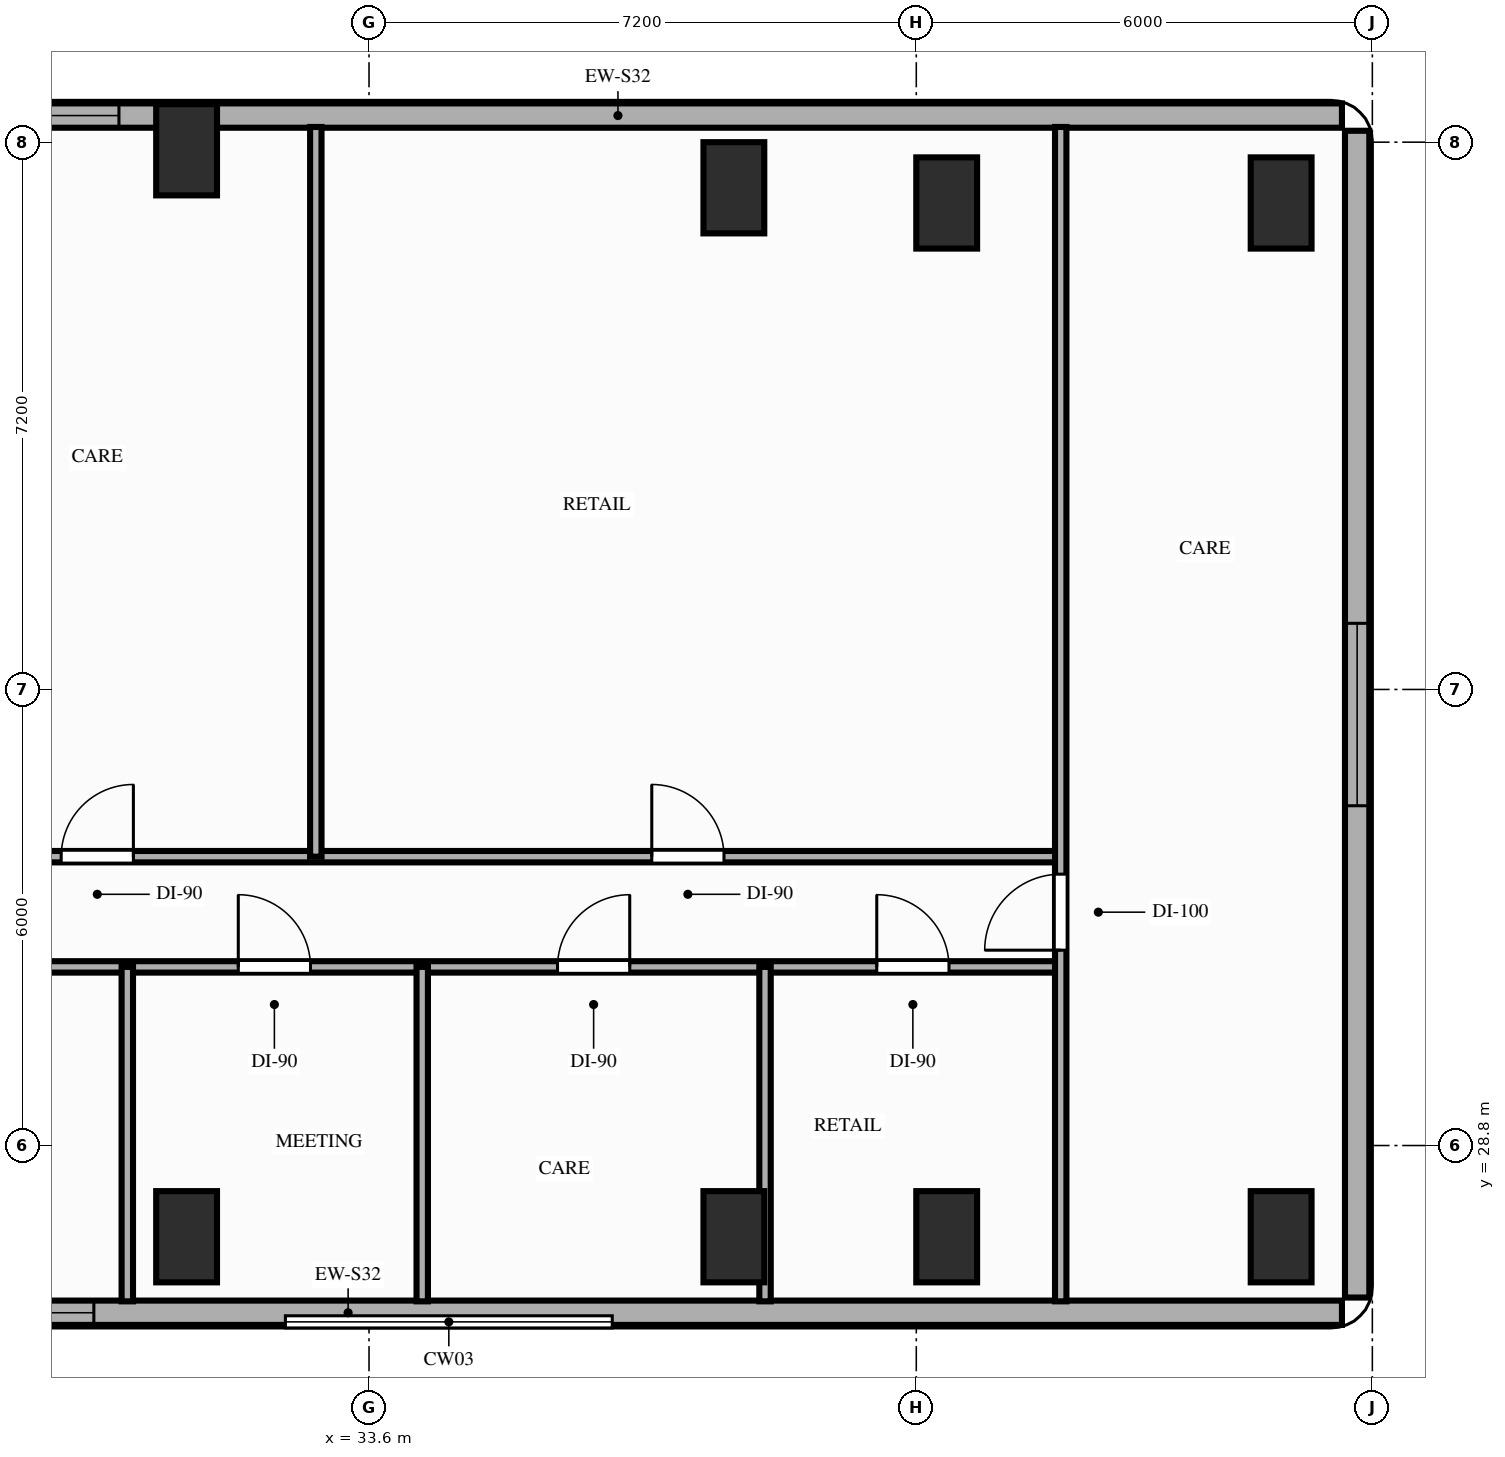
"""IFC4 building model, lengths in metres.
Left out: names, types, materials, properties, quantities, classifications, styles, units other than length and angle.
Written with IfcOpenShell. Run it as: python <this file> out.ifc"""

import sys

from ifc_helpers import new_model, si_unit, direction, frame, frame_2d, origin, origin_2d, place, context, subcontext, project, spatial, rectangle, extrude, element, fill, save


model = new_model("IFC4")
c1 = context("Model", 3, precision=1e-05, world=origin(), true_north=direction((0.0, 1.0)))
c2 = subcontext(c1, "Body", "Model", "MODEL_VIEW")
j1 = project(units=[si_unit("LENGTHUNIT", "METRE"), si_unit("PLANEANGLEUNIT", "RADIAN")], contexts=[c1])
p1 = place(None, origin())
s1 = spatial("IfcSite", under=j1, at=p1, CompositionType="ELEMENT")
p2 = place(p1, origin())
s2 = spatial("IfcBuilding", under=s1, at=p2, CompositionType="ELEMENT")
p3 = place(p2, frame((0.0, 0.0, 72.4)))
s3 = spatial("IfcBuildingStorey", under=s2, at=p3, CompositionType="ELEMENT", Elevation=72.4)
for number, where, z_axis, x_axis in (
    (1, (31.2, 27.6, 0.0), (0.0, 0.0, 1.0), (1.0, 0.0, 0.0)),
    (2, (31.2, 41.9, 0.0), (0.0, 0.0, 1.0), (1.0, 0.0, 0.0)),
    (3, (38.4, 27.6, 0.0), (0.0, 0.0, 1.0), (1.0, 0.0, 0.0)),
    (4, (38.4, 41.4, 0.0), (0.0, 0.0, 1.0), (1.0, 0.0, 0.0)),
    (5, (41.2, 27.6, 0.0), (0.0, 0.0, 1.0), (1.0, 0.0, 0.0)),
    (6, (41.2, 41.2, 0.0), (0.0, 0.0, 1.0), (1.0, 0.0, 0.0)),
    (7, (45.6, 27.6, 0.0), (0.0, 0.0, 1.0), (1.0, 0.0, 0.0)),
    (8, (45.6, 41.2, 0.0), (0.0, 0.0, 1.0), (1.0, 0.0, 0.0)),
):
    element("IfcColumn", number, at=place(p3, frame(where, z_axis=z_axis, x_axis=x_axis)), inside=s3, PredefinedType="COLUMN", context=c2, shape_type="SweptSolid", body=[
        extrude(rectangle(XDim=0.8, YDim=1.2, at=origin_2d()), origin(), (0.0, 0.0, 1.0), 3.2),
    ])
p4 = place(p3, frame((46.4, 42.35, 0.0), z_axis=(0.0, 0.0, 1.0), x_axis=(-1.0, 0.0, 0.0)))
e9 = element("IfcWall", 9, at=p4, inside=s3, PredefinedType="STANDARD", context=c2, shape_type="SweptSolid", body=[
    extrude(rectangle(XDim=19.05, YDim=0.32, at=frame_2d((9.525, 0.0))), origin(), (0.0, 0.0, 1.0), 2.35),
])
p5 = place(p4, frame((16.09, 0.0, 0.85)))
e10 = element("IfcOpeningElement", 10, at=p5, cuts=e9, PredefinedType="OPENING", context=c2, shape_type="SweptSolid", body=[
    extrude(rectangle(XDim=2.4, YDim=1.25, at=frame_2d((1.2, 0.625))), frame((0.0, 0.17, 0.0), z_axis=(0.0, -1.0, 0.0), x_axis=(1.0, 0.0, 0.0)), (0.0, 0.0, 1.0), 0.34),
])
p6 = place(p3, frame((20.25, 26.6, 0.0), z_axis=(0.0, 0.0, 1.0), x_axis=(1.0, 0.0, 0.0)))
e11 = element("IfcWall", 11, at=p6, inside=s3, PredefinedType="STANDARD", context=c2, shape_type="SweptSolid", body=[
    extrude(rectangle(XDim=26.15, YDim=0.32, at=frame_2d((13.075, 0.0))), origin(), (0.0, 0.0, 1.0), 2.96),
])
p7 = place(p6, frame((2.35, 0.0, 0.85)))
e12 = element("IfcOpeningElement", 12, at=p7, cuts=e11, PredefinedType="OPENING", context=c2, shape_type="SweptSolid", body=[
    extrude(rectangle(XDim=2.4, YDim=1.8, at=frame_2d((1.2, 0.9))), frame((0.0, 0.17, 0.0), z_axis=(0.0, -1.0, 0.0), x_axis=(1.0, 0.0, 0.0)), (0.0, 0.0, 1.0), 0.34),
])
p8 = place(p6, frame((7.33, 0.0, 0.85)))
e13 = element("IfcOpeningElement", 13, at=p8, cuts=e11, PredefinedType="OPENING", context=c2, shape_type="SweptSolid", body=[
    extrude(rectangle(XDim=2.4, YDim=1.8, at=frame_2d((1.2, 0.9))), frame((0.0, 0.17, 0.0), z_axis=(0.0, -1.0, 0.0), x_axis=(1.0, 0.0, 0.0)), (0.0, 0.0, 1.0), 0.34),
])
p9 = place(p3, frame((46.6, 26.8, 0.0), z_axis=(0.0, 0.0, 1.0), x_axis=(0.0, 1.0, 0.0)))
e14 = element("IfcWall", 14, at=p9, inside=s3, PredefinedType="STANDARD", context=c2, shape_type="SweptSolid", body=[
    extrude(rectangle(XDim=15.35, YDim=0.32, at=frame_2d((7.675, 0.0))), origin(), (0.0, 0.0, 1.0), 2.96),
])
p10 = place(p9, frame((6.47, 0.0, 0.85)))
e15 = element("IfcOpeningElement", 15, at=p10, cuts=e14, PredefinedType="OPENING", context=c2, shape_type="SweptSolid", body=[
    extrude(rectangle(XDim=2.4, YDim=1.8, at=frame_2d((1.2, 0.9))), frame((0.0, 0.17, 0.0), z_axis=(0.0, -1.0, 0.0), x_axis=(1.0, 0.0, 0.0)), (0.0, 0.0, 1.0), 0.34),
])
p11 = place(p3, frame((27.15, 31.15, 0.0), z_axis=(0.0, 0.0, 1.0), x_axis=(1.0, 0.0, 0.0)))
e16 = element("IfcWall", 16, at=p11, inside=s3, PredefinedType="PARTITIONING", context=c2, shape_type="SweptSolid", body=[
    extrude(rectangle(XDim=15.55, YDim=0.15, at=frame_2d((7.775, 0.0))), origin(), (0.0, 0.0, 1.0), 2.35),
])
p12 = place(p11, frame((1.16, 0.0, 0.0)))
e17 = element("IfcOpeningElement", 17, at=p12, cuts=e16, PredefinedType="OPENING", context=c2, shape_type="SweptSolid", body=[
    extrude(rectangle(XDim=0.95, YDim=2.15, at=frame_2d((0.475, 1.075))), frame((0.0, 0.085, 0.0), z_axis=(0.0, -1.0, 0.0), x_axis=(1.0, 0.0, 0.0)), (0.0, 0.0, 1.0), 0.17),
])
p13 = place(p11, frame((4.73, 0.0, 0.0)))
e18 = element("IfcOpeningElement", 18, at=p13, cuts=e16, PredefinedType="OPENING", context=c2, shape_type="SweptSolid", body=[
    extrude(rectangle(XDim=0.95, YDim=2.15, at=frame_2d((0.475, 1.075))), frame((0.0, 0.085, 0.0), z_axis=(0.0, -1.0, 0.0), x_axis=(1.0, 0.0, 0.0)), (0.0, 0.0, 1.0), 0.17),
])
p14 = place(p11, frame((8.93, 0.0, 0.0)))
e19 = element("IfcOpeningElement", 19, at=p14, cuts=e16, PredefinedType="OPENING", context=c2, shape_type="SweptSolid", body=[
    extrude(rectangle(XDim=0.95, YDim=2.15, at=frame_2d((0.475, 1.075))), frame((0.0, 0.085, 0.0), z_axis=(0.0, -1.0, 0.0), x_axis=(1.0, 0.0, 0.0)), (0.0, 0.0, 1.0), 0.17),
])
p15 = place(p11, frame((13.13, 0.0, 0.0)))
e20 = element("IfcOpeningElement", 20, at=p15, cuts=e16, PredefinedType="OPENING", context=c2, shape_type="SweptSolid", body=[
    extrude(rectangle(XDim=0.95, YDim=2.15, at=frame_2d((0.475, 1.075))), frame((0.0, 0.085, 0.0), z_axis=(0.0, -1.0, 0.0), x_axis=(1.0, 0.0, 0.0)), (0.0, 0.0, 1.0), 0.17),
])
p16 = place(p3, frame((27.15, 32.6, 0.0), z_axis=(0.0, 0.0, 1.0), x_axis=(1.0, 0.0, 0.0)))
e21 = element("IfcWall", 21, at=p16, inside=s3, PredefinedType="PARTITIONING", context=c2, shape_type="SweptSolid", body=[
    extrude(rectangle(XDim=15.55, YDim=0.15, at=frame_2d((7.775, 0.0))), origin(), (0.0, 0.0, 1.0), 2.35),
])
p17 = place(p16, frame((2.4, 0.0, 0.0)))
e22 = element("IfcOpeningElement", 22, at=p17, cuts=e21, PredefinedType="OPENING", context=c2, shape_type="SweptSolid", body=[
    extrude(rectangle(XDim=0.95, YDim=2.15, at=frame_2d((0.475, 1.075))), frame((0.0, 0.085, 0.0), z_axis=(0.0, -1.0, 0.0), x_axis=(1.0, 0.0, 0.0)), (0.0, 0.0, 1.0), 0.17),
])
p18 = place(p16, frame((10.17, 0.0, 0.0)))
e23 = element("IfcOpeningElement", 23, at=p18, cuts=e21, PredefinedType="OPENING", context=c2, shape_type="SweptSolid", body=[
    extrude(rectangle(XDim=0.95, YDim=2.15, at=frame_2d((0.475, 1.075))), frame((0.0, 0.085, 0.0), z_axis=(0.0, -1.0, 0.0), x_axis=(1.0, 0.0, 0.0)), (0.0, 0.0, 1.0), 0.17),
])
p19 = place(p3, frame((42.7, 26.75, 0.0), z_axis=(0.0, 0.0, 1.0), x_axis=(0.0, 1.0, 0.0)))
e24 = element("IfcWall", 24, at=p19, inside=s3, PredefinedType="PARTITIONING", context=c2, shape_type="SweptSolid", body=[
    extrude(rectangle(XDim=15.45, YDim=0.15, at=frame_2d((7.725, 0.0))), origin(), (0.0, 0.0, 1.0), 2.35),
])
p20 = place(p19, frame((4.62, 0.0, 0.0)))
e25 = element("IfcOpeningElement", 25, at=p20, cuts=e24, PredefinedType="OPENING", context=c2, shape_type="SweptSolid", body=[
    extrude(rectangle(XDim=1.0, YDim=2.15, at=frame_2d((0.5, 1.075))), frame((0.0, 0.085, 0.0), z_axis=(0.0, -1.0, 0.0), x_axis=(1.0, 0.0, 0.0)), (0.0, 0.0, 1.0), 0.17),
])
for number, where, z_axis, x_axis in (
    (26, (30.42, 26.75, 0.0), (0.0, 0.0, 1.0), (0.0, 1.0, 0.0)),
    (27, (34.3, 26.75, 0.0), (0.0, 0.0, 1.0), (0.0, 1.0, 0.0)),
    (28, (38.81, 26.75, 0.0), (0.0, 0.0, 1.0), (0.0, 1.0, 0.0)),
):
    element("IfcWall", number, at=place(p3, frame(where, z_axis=z_axis, x_axis=x_axis)), inside=s3, PredefinedType="PARTITIONING", context=c2, shape_type="SweptSolid", body=[
        extrude(rectangle(XDim=4.4, YDim=0.15, at=frame_2d((2.2, 0.0))), origin(), (0.0, 0.0, 1.0), 2.35),
    ])
p21 = place(p3, frame((32.9, 32.6, 0.0), z_axis=(0.0, 0.0, 1.0), x_axis=(0.0, 1.0, 0.0)))
e29 = element("IfcWall", 29, at=p21, inside=s3, PredefinedType="PARTITIONING", context=c2, shape_type="SweptSolid", body=[
    extrude(rectangle(XDim=9.6, YDim=0.15, at=frame_2d((4.8, 0.0))), origin(), (0.0, 0.0, 1.0), 2.35),
])
p22 = place(p10, origin())
e30 = element("IfcWindow", 30, at=p22, inside=s3, PartitioningType="SINGLE_PANEL", PredefinedType="WINDOW", context=c2, shape_type="SweptSolid", body=[
    extrude(rectangle(XDim=2.4, YDim=1.8, at=frame_2d((1.2, 0.9))), frame((0.0, 0.03, 0.0), z_axis=(0.0, -1.0, 0.0), x_axis=(1.0, 0.0, 0.0)), (0.0, 0.0, 1.0), 0.06),
])
fill(e15, e30)
p23 = place(p8, origin())
e31 = element("IfcWindow", 31, at=p23, inside=s3, PartitioningType="SINGLE_PANEL", PredefinedType="WINDOW", context=c2, shape_type="SweptSolid", body=[
    extrude(rectangle(XDim=2.4, YDim=1.8, at=frame_2d((1.2, 0.9))), frame((0.0, 0.03, 0.0), z_axis=(0.0, -1.0, 0.0), x_axis=(1.0, 0.0, 0.0)), (0.0, 0.0, 1.0), 0.06),
])
fill(e13, e31)
p24 = place(p5, origin())
e32 = element("IfcWindow", 32, at=p24, inside=s3, PartitioningType="SINGLE_PANEL", PredefinedType="WINDOW", context=c2, shape_type="SweptSolid", body=[
    extrude(rectangle(XDim=2.4, YDim=1.25, at=frame_2d((1.2, 0.625))), frame((0.0, 0.03, 0.0), z_axis=(0.0, -1.0, 0.0), x_axis=(1.0, 0.0, 0.0)), (0.0, 0.0, 1.0), 0.06),
])
fill(e10, e32)
p25 = place(p20, origin())
e33 = element("IfcDoor", 33, at=p25, inside=s3, OperationType="SINGLE_SWING_LEFT", PredefinedType="DOOR", context=c2, shape_type="SweptSolid", body=[
    extrude(rectangle(XDim=1.0, YDim=2.15, at=frame_2d((0.5, 1.075))), frame((0.0, 0.025, 0.0), z_axis=(0.0, -1.0, 0.0), x_axis=(1.0, 0.0, 0.0)), (0.0, 0.0, 1.0), 0.05),
])
fill(e25, e33)
p26 = place(p13, origin())
e34 = element("IfcDoor", 34, at=p26, inside=s3, OperationType="SINGLE_SWING_LEFT", PredefinedType="DOOR", context=c2, shape_type="SweptSolid", body=[
    extrude(rectangle(XDim=0.95, YDim=2.15, at=frame_2d((0.475, 1.075))), frame((0.0, 0.025, 0.0), z_axis=(0.0, -1.0, 0.0), x_axis=(1.0, 0.0, 0.0)), (0.0, 0.0, 1.0), 0.05),
])
fill(e18, e34)
p27 = place(p14, origin())
e35 = element("IfcDoor", 35, at=p27, inside=s3, OperationType="SINGLE_SWING_RIGHT", PredefinedType="DOOR", context=c2, shape_type="SweptSolid", body=[
    extrude(rectangle(XDim=0.95, YDim=2.15, at=frame_2d((0.475, 1.075))), frame((0.0, 0.025, 0.0), z_axis=(0.0, -1.0, 0.0), x_axis=(1.0, 0.0, 0.0)), (0.0, 0.0, 1.0), 0.05),
])
fill(e19, e35)
p28 = place(p15, origin())
e36 = element("IfcDoor", 36, at=p28, inside=s3, OperationType="SINGLE_SWING_LEFT", PredefinedType="DOOR", context=c2, shape_type="SweptSolid", body=[
    extrude(rectangle(XDim=0.95, YDim=2.15, at=frame_2d((0.475, 1.075))), frame((0.0, 0.025, 0.0), z_axis=(0.0, -1.0, 0.0), x_axis=(1.0, 0.0, 0.0)), (0.0, 0.0, 1.0), 0.05),
])
fill(e20, e36)
p29 = place(p17, origin())
e37 = element("IfcDoor", 37, at=p29, inside=s3, OperationType="SINGLE_SWING_RIGHT", PredefinedType="DOOR", context=c2, shape_type="SweptSolid", body=[
    extrude(rectangle(XDim=0.95, YDim=2.15, at=frame_2d((0.475, 1.075))), frame((0.0, 0.025, 0.0), z_axis=(0.0, -1.0, 0.0), x_axis=(1.0, 0.0, 0.0)), (0.0, 0.0, 1.0), 0.05),
])
fill(e22, e37)
p30 = place(p18, origin())
e38 = element("IfcDoor", 38, at=p30, inside=s3, OperationType="SINGLE_SWING_LEFT", PredefinedType="DOOR", context=c2, shape_type="SweptSolid", body=[
    extrude(rectangle(XDim=0.95, YDim=2.15, at=frame_2d((0.475, 1.075))), frame((0.0, 0.025, 0.0), z_axis=(0.0, -1.0, 0.0), x_axis=(1.0, 0.0, 0.0)), (0.0, 0.0, 1.0), 0.05),
])
fill(e23, e38)
save(model, sys.argv[1])
